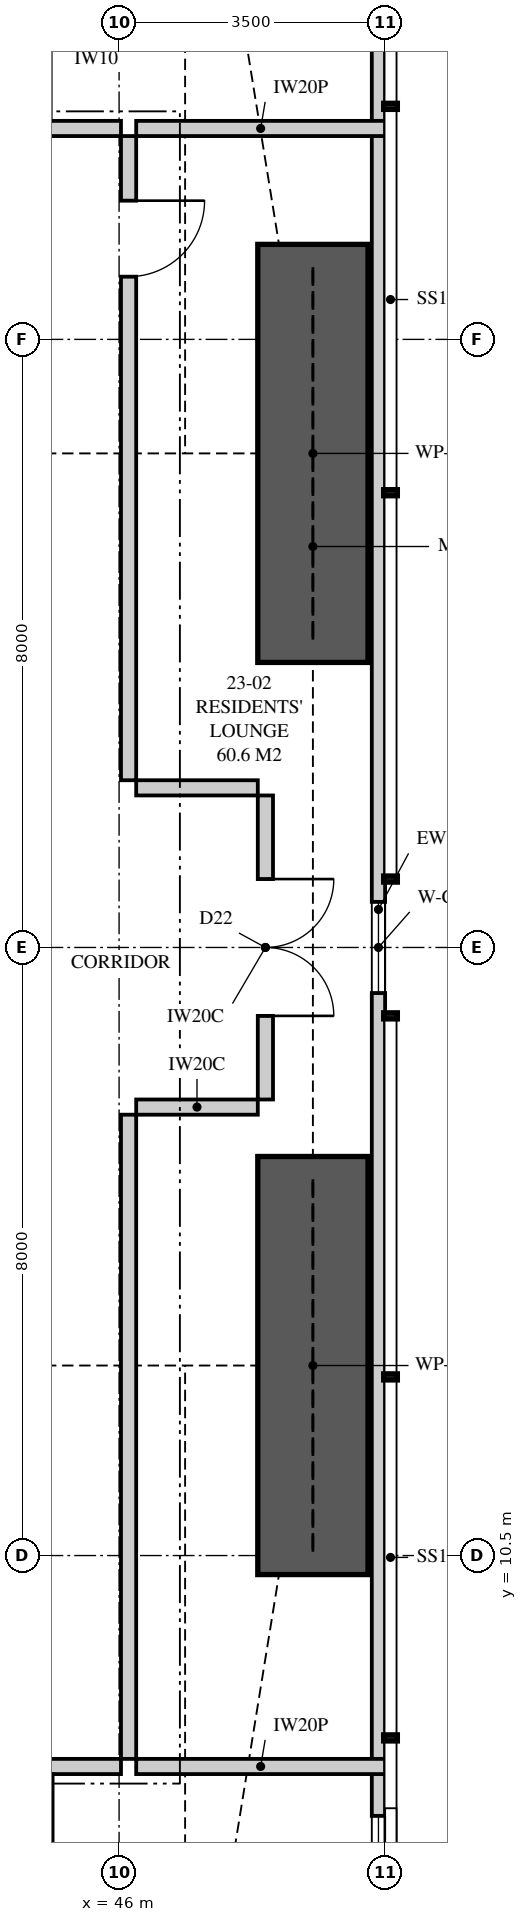
"""IFC4 building model, lengths in metres.
Left out: names, types, materials, properties, quantities, classifications, styles, units other than length and angle.
Written with IfcOpenShell. Run it as: python <this file> out.ifc"""

import sys

from ifc_helpers import new_model, si_unit, direction, frame, frame_2d, origin, place, context, subcontext, project, spatial, polyline, rectangle, outline, extrude, element, fill, save


model = new_model("IFC4")
c1 = context("Model", 3, precision=1e-05, world=origin(), true_north=direction((0.0, 1.0)))
c2 = subcontext(c1, "Body", "Model", "MODEL_VIEW")
j1 = project(units=[si_unit("LENGTHUNIT", "METRE"), si_unit("PLANEANGLEUNIT", "RADIAN")], contexts=[c1])
p1 = place(None, origin())
s1 = spatial("IfcSite", under=j1, at=p1, CompositionType="ELEMENT")
p2 = place(p1, origin())
s2 = spatial("IfcBuilding", under=s1, at=p2, CompositionType="ELEMENT")
p3 = place(p2, frame((0.0, 0.0, 88.1)))
s3 = spatial("IfcBuildingStorey", under=s2, at=p3, CompositionType="ELEMENT", Elevation=88.1)
p4 = place(p3, frame((49.413, 3.051, 0.0), z_axis=(0.0, 0.0, 1.0), x_axis=(0.0, 1.0, 0.0)))
e1 = element("IfcWall", 1, at=p4, inside=s3, PredefinedType="SOLIDWALL", context=c2, shape_type="SweptSolid", body=[
    extrude(outline(polyline([(0.0, 0.0), (31.897, 0.0), (31.897, 3.11), (22.167, 3.11), (22.167, 2.15), (22.074, 2.15), (22.074, 3.11), (21.949, 3.11), (21.949, 2.15), (9.949, 2.15), (9.949, 3.11), (9.823, 3.11), (9.823, 2.15), (9.73, 2.15), (9.73, 3.11), (0.0, 3.11), (0.0, 0.0)])), frame((0.0, 0.087, 0.0), z_axis=(0.0, -1.0, 0.0), x_axis=(1.0, 0.0, 0.0)), (0.0, 0.0, 1.0), 0.175),
])
p5 = place(p4, frame((2.224, 0.0, 0.4)))
e2 = element("IfcOpeningElement", 2, at=p5, cuts=e1, PredefinedType="OPENING", context=c2, shape_type="SweptSolid", body=[
    extrude(rectangle(XDim=1.8, YDim=1.7, at=frame_2d((0.9, 0.85))), frame((0.0, 0.097, 0.0), z_axis=(0.0, -1.0, 0.0), x_axis=(1.0, 0.0, 0.0)), (0.0, 0.0, 1.0), 0.195),
])
p6 = place(p4, frame((14.849, 0.0, 0.4)))
e3 = element("IfcOpeningElement", 3, at=p6, cuts=e1, PredefinedType="OPENING", context=c2, shape_type="SweptSolid", body=[
    extrude(rectangle(XDim=1.2, YDim=1.7, at=frame_2d((0.6, 0.85))), frame((0.0, 0.097, 0.0), z_axis=(0.0, -1.0, 0.0), x_axis=(1.0, 0.0, 0.0)), (0.0, 0.0, 1.0), 0.195),
])
p7 = place(p4, frame((27.373, 0.0, 0.4)))
e4 = element("IfcOpeningElement", 4, at=p7, cuts=e1, PredefinedType="OPENING", context=c2, shape_type="SweptSolid", body=[
    extrude(rectangle(XDim=1.8, YDim=1.7, at=frame_2d((0.9, 0.85))), frame((0.0, 0.097, 0.0), z_axis=(0.0, -1.0, 0.0), x_axis=(1.0, 0.0, 0.0)), (0.0, 0.0, 1.0), 0.195),
])
p8 = place(p3, frame((37.925, 7.725, 0.0), z_axis=(0.0, 0.0, 1.0), x_axis=(1.0, 0.0, 0.0)))
e5 = element("IfcWall", 5, at=p8, inside=s3, PredefinedType="PARTITIONING", context=c2, shape_type="SweptSolid", body=[
    extrude(outline(polyline([(0.0, 0.0), (8.1, 0.0), (8.1, 3.11), (1.046, 3.11), (1.046, 2.531), (0.354, 2.531), (0.354, 3.11), (0.0, 3.11), (0.0, 0.0)])), frame((0.0, 0.1, 0.0), z_axis=(0.0, -1.0, 0.0), x_axis=(1.0, 0.0, 0.0)), (0.0, 0.0, 1.0), 0.2),
])
p9 = place(p8, frame((2.4, 0.0, 0.0)))
e6 = element("IfcOpeningElement", 6, at=p9, cuts=e5, PredefinedType="OPENING", context=c2, shape_type="SweptSolid", body=[
    extrude(rectangle(XDim=1.05, YDim=2.2, at=frame_2d((0.525, 1.1))), frame((0.0, 0.11, 0.0), z_axis=(0.0, -1.0, 0.0), x_axis=(1.0, 0.0, 0.0)), (0.0, 0.0, 1.0), 0.22),
])
p10 = place(p3, frame((46.225, 7.725, 0.0), z_axis=(0.0, 0.0, 1.0), x_axis=(1.0, 0.0, 0.0)))
e7 = element("IfcWall", 7, at=p10, inside=s3, PredefinedType="PARTITIONING", context=c2, shape_type="SweptSolid", body=[
    extrude(outline(polyline([(0.0, 0.0), (3.275, 0.0), (3.275, 3.11), (2.392, 3.11), (2.392, 2.15), (0.643, 2.15), (0.643, 2.531), (0.297, 2.531), (0.297, 3.11), (0.0, 3.11), (0.0, 0.0)])), frame((0.0, 0.1, 0.0), z_axis=(0.0, -1.0, 0.0), x_axis=(1.0, 0.0, 0.0)), (0.0, 0.0, 1.0), 0.2),
])
p11 = place(p3, frame((37.6, 29.275, 0.0), z_axis=(0.0, 0.0, 1.0), x_axis=(1.0, 0.0, 0.0)))
e8 = element("IfcWall", 8, at=p11, inside=s3, PredefinedType="PARTITIONING", context=c2, shape_type="SweptSolid", body=[
    extrude(outline(polyline([(0.0, 0.0), (8.425, 0.0), (8.425, 3.11), (1.371, 3.11), (1.371, 2.531), (0.679, 2.531), (0.679, 3.11), (0.0, 3.11), (0.0, 0.0)])), frame((0.0, 0.1, 0.0), z_axis=(0.0, -1.0, 0.0), x_axis=(1.0, 0.0, 0.0)), (0.0, 0.0, 1.0), 0.2),
])
p12 = place(p11, frame((3.8, 0.0, 0.0)))
e9 = element("IfcOpeningElement", 9, at=p12, cuts=e8, PredefinedType="OPENING", context=c2, shape_type="SweptSolid", body=[
    extrude(rectangle(XDim=1.05, YDim=2.2, at=frame_2d((0.525, 1.1))), frame((0.0, 0.11, 0.0), z_axis=(0.0, -1.0, 0.0), x_axis=(1.0, 0.0, 0.0)), (0.0, 0.0, 1.0), 0.22),
])
p13 = place(p3, frame((46.225, 29.275, 0.0), z_axis=(0.0, 0.0, 1.0), x_axis=(1.0, 0.0, 0.0)))
e10 = element("IfcWall", 10, at=p13, inside=s3, PredefinedType="PARTITIONING", context=c2, shape_type="SweptSolid", body=[
    extrude(outline(polyline([(0.0, 0.0), (3.275, 0.0), (3.275, 3.11), (2.554, 3.11), (2.554, 2.15), (0.805, 2.15), (0.805, 2.531), (0.297, 2.531), (0.297, 3.11), (0.0, 3.11), (0.0, 0.0)])), frame((0.0, 0.1, 0.0), z_axis=(0.0, -1.0, 0.0), x_axis=(1.0, 0.0, 0.0)), (0.0, 0.0, 1.0), 0.2),
])
p14 = place(p3, frame((46.125, 7.825, 0.0), z_axis=(0.0, 0.0, 1.0), x_axis=(0.0, 1.0, 0.0)))
e11 = element("IfcWall", 11, at=p14, inside=s3, PredefinedType="PARTITIONING", context=c2, shape_type="SweptSolid", body=[
    extrude(outline(polyline([(0.0, 0.0), (8.475, 0.0), (8.475, 3.11), (5.521, 3.11), (5.521, 2.531), (4.829, 2.531), (4.829, 3.11), (0.0, 3.11), (0.0, 0.0)])), frame((0.0, 0.1, 0.0), z_axis=(0.0, -1.0, 0.0), x_axis=(1.0, 0.0, 0.0)), (0.0, 0.0, 1.0), 0.2),
])
p15 = place(p3, frame((46.125, 20.7, 0.0), z_axis=(0.0, 0.0, 1.0), x_axis=(0.0, 1.0, 0.0)))
e12 = element("IfcWall", 12, at=p15, inside=s3, PredefinedType="PARTITIONING", context=c2, shape_type="SweptSolid", body=[
    extrude(outline(polyline([(0.0, 0.0), (8.475, 0.0), (8.475, 3.11), (4.646, 3.11), (4.646, 2.531), (3.954, 2.531), (3.954, 3.11), (0.0, 3.11), (0.0, 0.0)])), frame((0.0, 0.1, 0.0), z_axis=(0.0, -1.0, 0.0), x_axis=(1.0, 0.0, 0.0)), (0.0, 0.0, 1.0), 0.2),
])
p16 = place(p15, frame((6.625, 0.0, 0.0)))
e13 = element("IfcOpeningElement", 13, at=p16, cuts=e12, PredefinedType="OPENING", context=c2, shape_type="SweptSolid", body=[
    extrude(rectangle(XDim=1.0, YDim=2.1, at=frame_2d((0.5, 1.05))), frame((0.0, 0.11, 0.0), z_axis=(0.0, -1.0, 0.0), x_axis=(1.0, 0.0, 0.0)), (0.0, 0.0, 1.0), 0.22),
])
p17 = place(p3, frame((47.925, 16.5, 0.0), z_axis=(0.0, 0.0, 1.0), x_axis=(0.0, 1.0, 0.0)))
e14 = element("IfcWall", 14, at=p17, inside=s3, PredefinedType="PARTITIONING", context=c2, shape_type="SweptSolid", body=[
    extrude(outline(polyline([(0.0, 0.0), (4.0, 0.0), (4.0, 3.11), (4.0, 2.15), (0.0, 2.15), (0.0, 3.11), (0.0, 0.0)])), frame((0.0, 0.1, 0.0), z_axis=(0.0, -1.0, 0.0), x_axis=(1.0, 0.0, 0.0)), (0.0, 0.0, 1.0), 0.2),
])
p18 = place(p17, frame((1.1, 0.0, 0.0)))
e15 = element("IfcOpeningElement", 15, at=p18, cuts=e14, PredefinedType="OPENING", context=c2, shape_type="SweptSolid", body=[
    extrude(rectangle(XDim=1.8, YDim=2.1, at=frame_2d((0.9, 1.05))), frame((0.0, 0.11, 0.0), z_axis=(0.0, -1.0, 0.0), x_axis=(1.0, 0.0, 0.0)), (0.0, 0.0, 1.0), 0.22),
])
for number, where, z_axis, x_axis in (
    (16, (46.225, 16.4, 0.0), (0.0, 0.0, 1.0), (1.0, 0.0, 0.0)),
    (17, (46.225, 20.6, 0.0), (0.0, 0.0, 1.0), (1.0, 0.0, 0.0)),
):
    element("IfcWall", number, at=place(p3, frame(where, z_axis=z_axis, x_axis=x_axis)), inside=s3, PredefinedType="PARTITIONING", context=c2, shape_type="SweptSolid", body=[
        extrude(outline(polyline([(0.0, 0.0), (1.6, 0.0), (1.6, 3.11), (1.6, 2.15), (1.415, 2.15), (1.415, 3.11), (0.0, 3.11), (0.0, 0.0)])), frame((0.0, 0.1, 0.0), z_axis=(0.0, -1.0, 0.0), x_axis=(1.0, 0.0, 0.0)), (0.0, 0.0, 1.0), 0.2),
    ])
for number, where, z_axis, x_axis in (
    (18, (48.55, 10.25, 0.0), (0.0, 0.0, 1.0), (0.0, 1.0, 0.0)),
    (19, (48.55, 22.25, 0.0), (0.0, 0.0, 1.0), (0.0, 1.0, 0.0)),
):
    element("IfcWall", number, at=place(p3, frame(where, z_axis=z_axis, x_axis=x_axis)), inside=s3, PredefinedType="SHEAR", context=c2, shape_type="SweptSolid", body=[
        extrude(rectangle(XDim=5.5, YDim=1.45, at=frame_2d((2.75, 0.0))), origin(), (0.0, 0.0, 1.0), 3.35),
    ])
p19 = place(p5, origin())
e20 = element("IfcWindow", 20, at=p19, inside=s3, PartitioningType="SINGLE_PANEL", PredefinedType="WINDOW", context=c2, shape_type="SweptSolid", body=[
    extrude(rectangle(XDim=1.8, YDim=1.7, at=frame_2d((0.9, 0.85))), frame((0.0, 0.03, 0.0), z_axis=(0.0, -1.0, 0.0), x_axis=(1.0, 0.0, 0.0)), (0.0, 0.0, 1.0), 0.06),
])
fill(e2, e20)
p20 = place(p6, origin())
e21 = element("IfcWindow", 21, at=p20, inside=s3, PartitioningType="SINGLE_PANEL", PredefinedType="WINDOW", context=c2, shape_type="SweptSolid", body=[
    extrude(rectangle(XDim=1.2, YDim=1.7, at=frame_2d((0.6, 0.85))), frame((0.0, 0.03, 0.0), z_axis=(0.0, -1.0, 0.0), x_axis=(1.0, 0.0, 0.0)), (0.0, 0.0, 1.0), 0.06),
])
fill(e3, e21)
p21 = place(p18, frame((1.8, 0.0, 0.0), z_axis=(0.0, 0.0, 1.0), x_axis=(-1.0, 0.0, 0.0)))
e22 = element("IfcDoor", 22, at=p21, inside=s3, OperationType="DOUBLE_DOOR_SINGLE_SWING", PredefinedType="DOOR", context=c2, shape_type="SweptSolid", body=[
    extrude(rectangle(XDim=1.8, YDim=2.1, at=frame_2d((0.9, 1.05))), frame((0.0, 0.025, 0.0), z_axis=(0.0, -1.0, 0.0), x_axis=(1.0, 0.0, 0.0)), (0.0, 0.0, 1.0), 0.05),
])
fill(e15, e22)
p22 = place(p16, frame((1.0, 0.0, 0.0), z_axis=(0.0, 0.0, 1.0), x_axis=(-1.0, 0.0, 0.0)))
e23 = element("IfcDoor", 23, at=p22, inside=s3, OperationType="SINGLE_SWING_LEFT", PredefinedType="DOOR", context=c2, shape_type="SweptSolid", body=[
    extrude(rectangle(XDim=1.0, YDim=2.1, at=frame_2d((0.5, 1.05))), frame((0.0, 0.025, 0.0), z_axis=(0.0, -1.0, 0.0), x_axis=(1.0, 0.0, 0.0)), (0.0, 0.0, 1.0), 0.05),
])
fill(e13, e23)
save(model, sys.argv[1])
